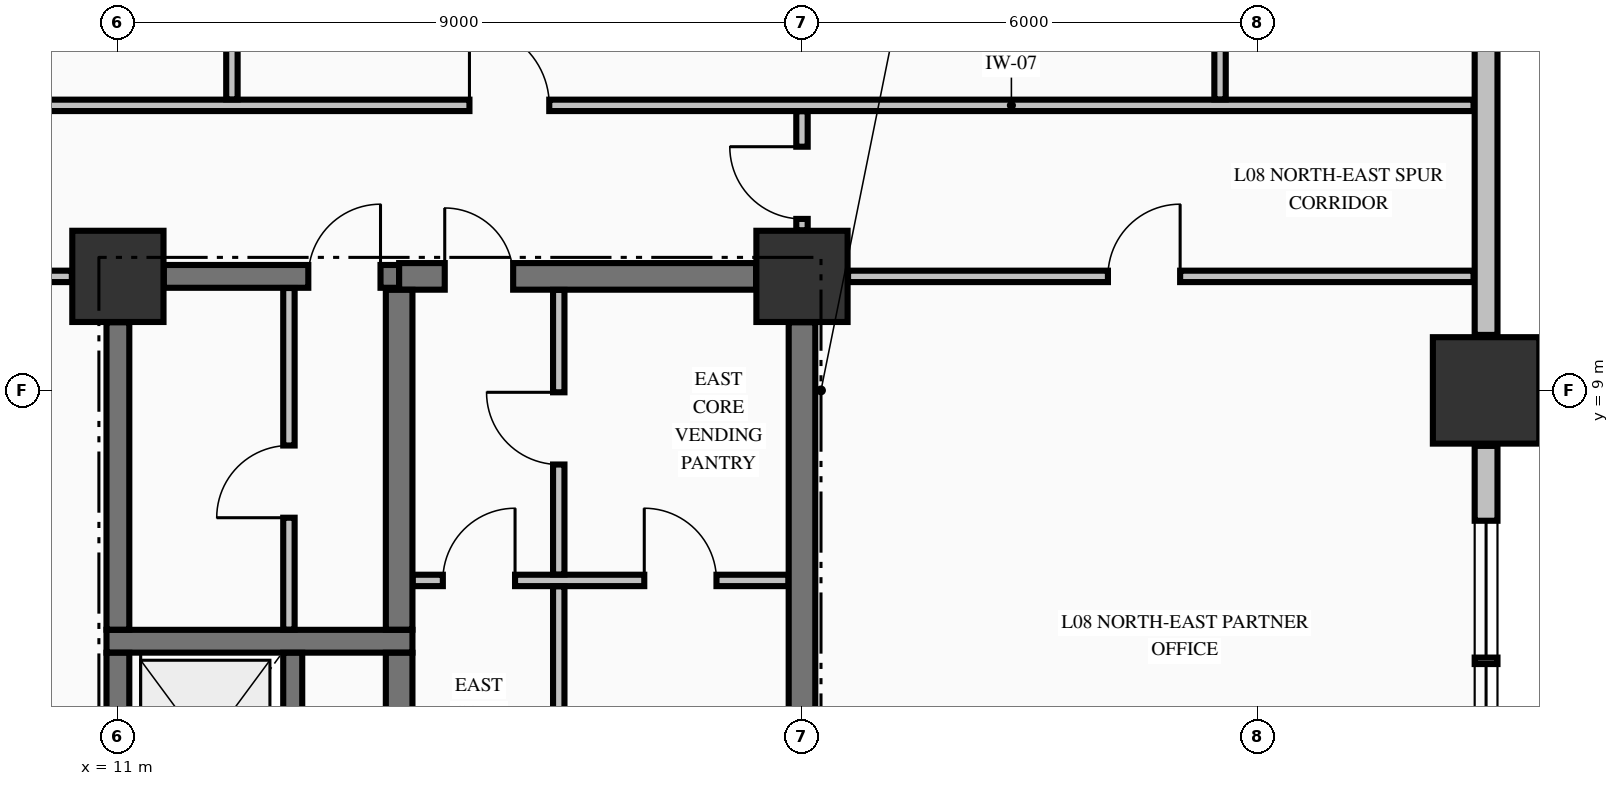
"""IFC4 building model, lengths in metres.
Left out: names, types, materials, properties, quantities, classifications, styles, units other than length and angle.
Written with IfcOpenShell. Run it as: python <this file> out.ifc"""

import sys

from ifc_helpers import new_model, si_unit, direction, frame, frame_2d, origin, origin_2d, place, context, subcontext, project, spatial, rectangle, extrude, element, fill, save


model = new_model("IFC4")
c1 = context("Model", 3, precision=1e-05, world=origin(), true_north=direction((0.0, 1.0)))
c2 = subcontext(c1, "Body", "Model", "MODEL_VIEW")
j1 = project(units=[si_unit("LENGTHUNIT", "METRE"), si_unit("PLANEANGLEUNIT", "RADIAN")], contexts=[c1])
p1 = place(None, origin())
s1 = spatial("IfcSite", under=j1, at=p1, CompositionType="ELEMENT")
p2 = place(p1, origin())
s2 = spatial("IfcBuilding", under=s1, at=p2, CompositionType="ELEMENT")
p3 = place(p2, frame((0.0, 0.0, 37.91)))
s3 = spatial("IfcBuildingStorey", under=s2, at=p3, CompositionType="ELEMENT", Elevation=37.91)
p4 = place(p3, frame((29.0, 9.0, -0.25), z_axis=(0.0, 0.0, 1.0), x_axis=(1.0, 0.0, 0.0)))
e1 = element("IfcColumn", 1, at=p4, inside=s3, PredefinedType="COLUMN", context=c2, shape_type="SweptSolid", body=[
    extrude(rectangle(XDim=1.4, YDim=1.4, at=origin_2d()), origin(), (0.0, 0.0, 1.0), 3.57),
])
for number, where, z_axis, x_axis in (
    (2, (11.0, 10.5, -0.25), (0.0, 0.0, 1.0), (1.0, 0.0, 0.0)),
    (3, (20.0, 10.5, -0.25), (0.0, 0.0, 1.0), (1.0, 0.0, 0.0)),
):
    element("IfcColumn", number, at=place(p3, frame(where, z_axis=z_axis, x_axis=x_axis)), inside=s3, PredefinedType="COLUMN", context=c2, shape_type="SweptSolid", body=[
        extrude(rectangle(XDim=1.2, YDim=1.2, at=origin_2d()), origin(), (0.0, 0.0, 1.0), 3.57),
    ])
p5 = place(p3, frame((29.0, 0.73, 0.0), z_axis=(0.0, 0.0, 1.0), x_axis=(0.0, 1.0, 0.0)))
e4 = element("IfcWall", 4, at=p5, inside=s3, PredefinedType="STANDARD", context=c2, shape_type="SweptSolid", body=[
    extrude(rectangle(XDim=7.54, YDim=0.3, at=frame_2d((3.77, 0.0))), origin(), (0.0, 0.0, 1.0), 2.712),
])
p6 = place(p5, frame((2.87, 0.0, 0.78)))
e5 = element("IfcOpeningElement", 5, at=p6, cuts=e4, PredefinedType="OPENING", context=c2, shape_type="SweptSolid", body=[
    extrude(rectangle(XDim=1.8, YDim=1.72, at=frame_2d((0.9, 0.86))), frame((0.0, 0.16, 0.0), z_axis=(0.0, -1.0, 0.0), x_axis=(1.0, 0.0, 0.0)), (0.0, 0.0, 1.0), 0.32),
])
p7 = place(p5, frame((4.755, 0.0, 0.78)))
e6 = element("IfcOpeningElement", 6, at=p7, cuts=e4, PredefinedType="OPENING", context=c2, shape_type="SweptSolid", body=[
    extrude(rectangle(XDim=1.8, YDim=1.72, at=frame_2d((0.9, 0.86))), frame((0.0, 0.16, 0.0), z_axis=(0.0, -1.0, 0.0), x_axis=(1.0, 0.0, 0.0)), (0.0, 0.0, 1.0), 0.32),
])
p8 = place(p3, frame((29.0, 9.73, 0.0), z_axis=(0.0, 0.0, 1.0), x_axis=(0.0, 1.0, 0.0)))
e7 = element("IfcWall", 7, at=p8, inside=s3, PredefinedType="STANDARD", context=c2, shape_type="SweptSolid", body=[
    extrude(rectangle(XDim=12.54, YDim=0.3, at=frame_2d((6.27, 0.0))), origin(), (0.0, 0.0, 1.0), 2.712),
])
p9 = place(p3, frame((10.85, 5.7, 0.0), z_axis=(0.0, 0.0, 1.0), x_axis=(1.0, 0.0, 0.0)))
e8 = element("IfcWall", 8, at=p9, inside=s3, PredefinedType="SHEAR", context=c2, shape_type="SweptSolid", body=[
    extrude(rectangle(XDim=4.025, YDim=0.3, at=frame_2d((2.012, 0.0))), origin(), (0.0, 0.0, 1.0), 3.32),
])
p10 = place(p3, frame((11.604, 10.5, 0.0), z_axis=(0.0, 0.0, 1.0), x_axis=(1.0, 0.0, 0.0)))
e9 = element("IfcWall", 9, at=p10, inside=s3, PredefinedType="SHEAR", context=c2, shape_type="SweptSolid", body=[
    extrude(rectangle(XDim=3.096, YDim=0.3, at=frame_2d((1.548, 0.0))), origin(), (0.0, 0.0, 1.0), 3.32),
])
p11 = place(p10, frame((1.901, 0.0, 0.0)))
e10 = element("IfcOpeningElement", 10, at=p11, cuts=e9, PredefinedType="OPENING", context=c2, shape_type="SweptSolid", body=[
    extrude(rectangle(XDim=0.95, YDim=2.15, at=frame_2d((0.475, 1.075))), frame((0.0, 0.16, 0.0), z_axis=(0.0, -1.0, 0.0), x_axis=(1.0, 0.0, 0.0)), (0.0, 0.0, 1.0), 0.32),
])
p12 = place(p3, frame((14.7, 10.5, 0.0), z_axis=(0.0, 0.0, 1.0), x_axis=(1.0, 0.0, 0.0)))
e11 = element("IfcWall", 11, at=p12, inside=s3, PredefinedType="SHEAR", context=c2, shape_type="SweptSolid", body=[
    extrude(rectangle(XDim=4.696, YDim=0.35, at=frame_2d((2.348, 0.0))), origin(), (0.0, 0.0, 1.0), 3.32),
])
p13 = place(p12, frame((0.6, 0.0, 0.0)))
e12 = element("IfcOpeningElement", 12, at=p13, cuts=e11, PredefinedType="OPENING", context=c2, shape_type="SweptSolid", body=[
    extrude(rectangle(XDim=0.9, YDim=2.15, at=frame_2d((0.45, 1.075))), frame((0.0, 0.185, 0.0), z_axis=(0.0, -1.0, 0.0), x_axis=(1.0, 0.0, 0.0)), (0.0, 0.0, 1.0), 0.37),
])
p14 = place(p3, frame((14.878, 6.5, 0.0), z_axis=(0.0, 0.0, 1.0), x_axis=(1.0, 0.0, 0.0)))
e13 = element("IfcWall", 13, at=p14, inside=s3, PredefinedType="PARTITIONING", context=c2, shape_type="SweptSolid", body=[
    extrude(rectangle(XDim=4.944, YDim=0.15, at=frame_2d((2.472, 0.0))), origin(), (0.0, 0.0, 1.0), 3.32),
])
p15 = place(p14, frame((0.397, 0.0, 0.0)))
e14 = element("IfcOpeningElement", 14, at=p15, cuts=e13, PredefinedType="OPENING", context=c2, shape_type="SweptSolid", body=[
    extrude(rectangle(XDim=0.95, YDim=2.15, at=frame_2d((0.475, 1.075))), frame((0.0, 0.085, 0.0), z_axis=(0.0, -1.0, 0.0), x_axis=(1.0, 0.0, 0.0)), (0.0, 0.0, 1.0), 0.17),
])
p16 = place(p14, frame((3.047, 0.0, 0.0)))
e15 = element("IfcOpeningElement", 15, at=p16, cuts=e13, PredefinedType="OPENING", context=c2, shape_type="SweptSolid", body=[
    extrude(rectangle(XDim=0.95, YDim=2.15, at=frame_2d((0.475, 1.075))), frame((0.0, 0.085, 0.0), z_axis=(0.0, -1.0, 0.0), x_axis=(1.0, 0.0, 0.0)), (0.0, 0.0, 1.0), 0.17),
])
p17 = place(p3, frame((-10.394, 10.5, 0.0), z_axis=(0.0, 0.0, 1.0), x_axis=(1.0, 0.0, 0.0)))
e16 = element("IfcWall", 16, at=p17, inside=s3, PredefinedType="PARTITIONING", context=c2, shape_type="SweptSolid", body=[
    extrude(rectangle(XDim=20.788, YDim=0.15, at=frame_2d((10.394, 0.0))), origin(), (0.0, 0.0, 1.0), 3.32),
])
p18 = place(p17, frame((0.319, 0.0, 0.0)))
e17 = element("IfcOpeningElement", 17, at=p18, cuts=e16, PredefinedType="OPENING", context=c2, shape_type="SweptSolid", body=[
    extrude(rectangle(XDim=1.05, YDim=2.15, at=frame_2d((0.525, 1.075))), frame((0.0, 0.085, 0.0), z_axis=(0.0, -1.0, 0.0), x_axis=(1.0, 0.0, 0.0)), (0.0, 0.0, 1.0), 0.17),
])
p19 = place(p17, frame((19.419, 0.0, 0.0)))
e18 = element("IfcOpeningElement", 18, at=p19, cuts=e16, PredefinedType="OPENING", context=c2, shape_type="SweptSolid", body=[
    extrude(rectangle(XDim=1.05, YDim=2.15, at=frame_2d((0.525, 1.075))), frame((0.0, 0.085, 0.0), z_axis=(0.0, -1.0, 0.0), x_axis=(1.0, 0.0, 0.0)), (0.0, 0.0, 1.0), 0.17),
])
p20 = place(p3, frame((20.606, 10.5, 0.0), z_axis=(0.0, 0.0, 1.0), x_axis=(1.0, 0.0, 0.0)))
e19 = element("IfcWall", 19, at=p20, inside=s3, PredefinedType="PARTITIONING", context=c2, shape_type="SweptSolid", body=[
    extrude(rectangle(XDim=8.229, YDim=0.15, at=frame_2d((4.115, 0.0))), origin(), (0.0, 0.0, 1.0), 3.32),
])
p21 = place(p20, frame((3.419, 0.0, 0.0)))
e20 = element("IfcOpeningElement", 20, at=p21, cuts=e19, PredefinedType="OPENING", context=c2, shape_type="SweptSolid", body=[
    extrude(rectangle(XDim=0.95, YDim=2.15, at=frame_2d((0.475, 1.075))), frame((0.0, 0.085, 0.0), z_axis=(0.0, -1.0, 0.0), x_axis=(1.0, 0.0, 0.0)), (0.0, 0.0, 1.0), 0.17),
])
p22 = place(p3, frame((-23.835, 12.75, 0.0), z_axis=(0.0, 0.0, 1.0), x_axis=(1.0, 0.0, 0.0)))
e21 = element("IfcWall", 21, at=p22, inside=s3, PredefinedType="PARTITIONING", context=c2, shape_type="SweptSolid", body=[
    extrude(rectangle(XDim=52.67, YDim=0.15, at=frame_2d((26.335, 0.0))), origin(), (0.0, 0.0, 1.0), 3.32),
])
p23 = place(p22, frame((5.71, 0.0, 0.0)))
e22 = element("IfcOpeningElement", 22, at=p23, cuts=e21, PredefinedType="OPENING", context=c2, shape_type="SweptSolid", body=[
    extrude(rectangle(XDim=0.95, YDim=2.15, at=frame_2d((0.475, 1.075))), frame((0.0, 0.085, 0.0), z_axis=(0.0, -1.0, 0.0), x_axis=(1.0, 0.0, 0.0)), (0.0, 0.0, 1.0), 0.17),
])
p24 = place(p22, frame((13.21, 0.0, 0.0)))
e23 = element("IfcOpeningElement", 23, at=p24, cuts=e21, PredefinedType="OPENING", context=c2, shape_type="SweptSolid", body=[
    extrude(rectangle(XDim=0.95, YDim=2.15, at=frame_2d((0.475, 1.075))), frame((0.0, 0.085, 0.0), z_axis=(0.0, -1.0, 0.0), x_axis=(1.0, 0.0, 0.0)), (0.0, 0.0, 1.0), 0.17),
])
p25 = place(p22, frame((17.56, 0.0, 0.0)))
e24 = element("IfcOpeningElement", 24, at=p25, cuts=e21, PredefinedType="OPENING", context=c2, shape_type="SweptSolid", body=[
    extrude(rectangle(XDim=0.95, YDim=2.15, at=frame_2d((0.475, 1.075))), frame((0.0, 0.085, 0.0), z_axis=(0.0, -1.0, 0.0), x_axis=(1.0, 0.0, 0.0)), (0.0, 0.0, 1.0), 0.17),
])
p26 = place(p22, frame((21.91, 0.0, 0.0)))
e25 = element("IfcOpeningElement", 25, at=p26, cuts=e21, PredefinedType="OPENING", context=c2, shape_type="SweptSolid", body=[
    extrude(rectangle(XDim=0.95, YDim=2.15, at=frame_2d((0.475, 1.075))), frame((0.0, 0.085, 0.0), z_axis=(0.0, -1.0, 0.0), x_axis=(1.0, 0.0, 0.0)), (0.0, 0.0, 1.0), 0.17),
])
p27 = place(p22, frame((31.21, 0.0, 0.0)))
e26 = element("IfcOpeningElement", 26, at=p27, cuts=e21, PredefinedType="OPENING", context=c2, shape_type="SweptSolid", body=[
    extrude(rectangle(XDim=1.05, YDim=2.15, at=frame_2d((0.525, 1.075))), frame((0.0, 0.085, 0.0), z_axis=(0.0, -1.0, 0.0), x_axis=(1.0, 0.0, 0.0)), (0.0, 0.0, 1.0), 0.17),
])
p28 = place(p22, frame((39.46, 0.0, 0.0)))
e27 = element("IfcOpeningElement", 27, at=p28, cuts=e21, PredefinedType="OPENING", context=c2, shape_type="SweptSolid", body=[
    extrude(rectangle(XDim=1.05, YDim=2.15, at=frame_2d((0.525, 1.075))), frame((0.0, 0.085, 0.0), z_axis=(0.0, -1.0, 0.0), x_axis=(1.0, 0.0, 0.0)), (0.0, 0.0, 1.0), 0.17),
])
p29 = place(p3, frame((11.0, 3.052, 0.0), z_axis=(0.0, 0.0, 1.0), x_axis=(0.0, 1.0, 0.0)))
e28 = element("IfcWall", 28, at=p29, inside=s3, PredefinedType="SHEAR", context=c2, shape_type="SweptSolid", body=[
    extrude(rectangle(XDim=2.496, YDim=0.3, at=frame_2d((1.248, 0.0))), origin(), (0.0, 0.0, 1.0), 3.32),
])
p30 = place(p3, frame((11.0, 5.852, 0.0), z_axis=(0.0, 0.0, 1.0), x_axis=(0.0, 1.0, 0.0)))
e29 = element("IfcWall", 29, at=p30, inside=s3, PredefinedType="SHEAR", context=c2, shape_type="SweptSolid", body=[
    extrude(rectangle(XDim=4.044, YDim=0.3, at=frame_2d((2.022, 0.0))), origin(), (0.0, 0.0, 1.0), 3.32),
])
p31 = place(p3, frame((13.3, 3.052, 0.0), z_axis=(0.0, 0.0, 1.0), x_axis=(0.0, 1.0, 0.0)))
e30 = element("IfcWall", 30, at=p31, inside=s3, PredefinedType="SOLIDWALL", context=c2, shape_type="SweptSolid", body=[
    extrude(rectangle(XDim=2.496, YDim=0.25, at=frame_2d((1.248, 0.0))), origin(), (0.0, 0.0, 1.0), 3.32),
])
p32 = place(p3, frame((14.7, 3.052, 0.0), z_axis=(0.0, 0.0, 1.0), x_axis=(0.0, 1.0, 0.0)))
e31 = element("IfcWall", 31, at=p32, inside=s3, PredefinedType="SHEAR", context=c2, shape_type="SweptSolid", body=[
    extrude(rectangle(XDim=2.496, YDim=0.35, at=frame_2d((1.248, 0.0))), origin(), (0.0, 0.0, 1.0), 3.32),
])
p33 = place(p3, frame((14.7, 5.852, 0.0), z_axis=(0.0, 0.0, 1.0), x_axis=(0.0, 1.0, 0.0)))
e32 = element("IfcWall", 32, at=p33, inside=s3, PredefinedType="SHEAR", context=c2, shape_type="SweptSolid", body=[
    extrude(rectangle(XDim=4.471, YDim=0.35, at=frame_2d((2.235, 0.0))), origin(), (0.0, 0.0, 1.0), 3.32),
])
p34 = place(p3, frame((20.0, 0.604, 0.0), z_axis=(0.0, 0.0, 1.0), x_axis=(0.0, 1.0, 0.0)))
e33 = element("IfcWall", 33, at=p34, inside=s3, PredefinedType="SHEAR", context=c2, shape_type="SweptSolid", body=[
    extrude(rectangle(XDim=9.292, YDim=0.35, at=frame_2d((4.646, 0.0))), origin(), (0.0, 0.0, 1.0), 3.32),
])
p35 = place(p3, frame((12.5, 12.828, 0.0), z_axis=(0.0, 0.0, 1.0), x_axis=(0.0, 1.0, 0.0)))
e34 = element("IfcWall", 34, at=p35, inside=s3, PredefinedType="PARTITIONING", context=c2, shape_type="SweptSolid", body=[
    extrude(rectangle(XDim=13.507, YDim=0.15, at=frame_2d((6.753, 0.0))), origin(), (0.0, 0.0, 1.0), 3.32),
])
p36 = place(p3, frame((13.25, 5.853, 0.0), z_axis=(0.0, 0.0, 1.0), x_axis=(0.0, 1.0, 0.0)))
e35 = element("IfcWall", 35, at=p36, inside=s3, PredefinedType="PARTITIONING", context=c2, shape_type="SweptSolid", body=[
    extrude(rectangle(XDim=4.494, YDim=0.15, at=frame_2d((2.247, 0.0))), origin(), (0.0, 0.0, 1.0), 3.32),
])
p37 = place(p36, frame((1.472, 0.0, 0.0)))
e36 = element("IfcOpeningElement", 36, at=p37, cuts=e35, PredefinedType="OPENING", context=c2, shape_type="SweptSolid", body=[
    extrude(rectangle(XDim=0.95, YDim=2.15, at=frame_2d((0.475, 1.075))), frame((0.0, 0.085, 0.0), z_axis=(0.0, -1.0, 0.0), x_axis=(1.0, 0.0, 0.0)), (0.0, 0.0, 1.0), 0.17),
])
p38 = place(p3, frame((16.8, 2.278, 0.0), z_axis=(0.0, 0.0, 1.0), x_axis=(0.0, 1.0, 0.0)))
e37 = element("IfcWall", 37, at=p38, inside=s3, PredefinedType="PARTITIONING", context=c2, shape_type="SweptSolid", body=[
    extrude(rectangle(XDim=4.144, YDim=0.15, at=frame_2d((2.072, 0.0))), origin(), (0.0, 0.0, 1.0), 3.32),
])
p39 = place(p3, frame((16.8, 6.578, 0.0), z_axis=(0.0, 0.0, 1.0), x_axis=(0.0, 1.0, 0.0)))
e38 = element("IfcWall", 38, at=p39, inside=s3, PredefinedType="PARTITIONING", context=c2, shape_type="SweptSolid", body=[
    extrude(rectangle(XDim=3.744, YDim=0.15, at=frame_2d((1.872, 0.0))), origin(), (0.0, 0.0, 1.0), 3.32),
])
p40 = place(p39, frame((1.447, 0.0, 0.0)))
e39 = element("IfcOpeningElement", 39, at=p40, cuts=e38, PredefinedType="OPENING", context=c2, shape_type="SweptSolid", body=[
    extrude(rectangle(XDim=0.95, YDim=2.15, at=frame_2d((0.475, 1.075))), frame((0.0, 0.085, 0.0), z_axis=(0.0, -1.0, 0.0), x_axis=(1.0, 0.0, 0.0)), (0.0, 0.0, 1.0), 0.17),
])
p41 = place(p3, frame((20.0, 11.106, 0.0), z_axis=(0.0, 0.0, 1.0), x_axis=(0.0, 1.0, 0.0)))
e40 = element("IfcWall", 40, at=p41, inside=s3, PredefinedType="PARTITIONING", context=c2, shape_type="SweptSolid", body=[
    extrude(rectangle(XDim=1.566, YDim=0.15, at=frame_2d((0.783, 0.0))), origin(), (0.0, 0.0, 1.0), 2.66),
])
p42 = place(p41, frame((0.15, 0.0, 0.0)))
e41 = element("IfcOpeningElement", 41, at=p42, cuts=e40, PredefinedType="OPENING", context=c2, shape_type="SweptSolid", body=[
    extrude(rectangle(XDim=0.95, YDim=2.15, at=frame_2d((0.475, 1.075))), frame((0.0, 0.085, 0.0), z_axis=(0.0, -1.0, 0.0), x_axis=(1.0, 0.0, 0.0)), (0.0, 0.0, 1.0), 0.17),
])
p43 = place(p3, frame((25.5, 12.828, 0.0), z_axis=(0.0, 0.0, 1.0), x_axis=(0.0, 1.0, 0.0)))
e42 = element("IfcWall", 42, at=p43, inside=s3, PredefinedType="PARTITIONING", context=c2, shape_type="SweptSolid", body=[
    extrude(rectangle(XDim=9.466, YDim=0.15, at=frame_2d((4.733, 0.0))), origin(), (0.0, 0.0, 1.0), 3.32),
])
p44 = place(p6, origin())
e43 = element("IfcWindow", 43, at=p44, inside=s3, PartitioningType="SINGLE_PANEL", PredefinedType="WINDOW", context=c2, shape_type="SweptSolid", body=[
    extrude(rectangle(XDim=1.8, YDim=1.72, at=frame_2d((0.9, 0.86))), frame((0.0, 0.03, 0.0), z_axis=(0.0, -1.0, 0.0), x_axis=(1.0, 0.0, 0.0)), (0.0, 0.0, 1.0), 0.06),
])
fill(e5, e43)
p45 = place(p7, origin())
e44 = element("IfcWindow", 44, at=p45, inside=s3, PartitioningType="SINGLE_PANEL", PredefinedType="WINDOW", context=c2, shape_type="SweptSolid", body=[
    extrude(rectangle(XDim=1.8, YDim=1.72, at=frame_2d((0.9, 0.86))), frame((0.0, 0.03, 0.0), z_axis=(0.0, -1.0, 0.0), x_axis=(1.0, 0.0, 0.0)), (0.0, 0.0, 1.0), 0.06),
])
fill(e6, e44)
p46 = place(p11, origin())
e45 = element("IfcDoor", 45, at=p46, inside=s3, OperationType="SINGLE_SWING_RIGHT", PredefinedType="DOOR", context=c2, shape_type="SweptSolid", body=[
    extrude(rectangle(XDim=0.95, YDim=2.15, at=frame_2d((0.475, 1.075))), frame((0.0, 0.025, 0.0), z_axis=(0.0, -1.0, 0.0), x_axis=(1.0, 0.0, 0.0)), (0.0, 0.0, 1.0), 0.05),
])
fill(e10, e45)
p47 = place(p37, origin())
e46 = element("IfcDoor", 46, at=p47, inside=s3, OperationType="SINGLE_SWING_LEFT", PredefinedType="DOOR", context=c2, shape_type="SweptSolid", body=[
    extrude(rectangle(XDim=0.95, YDim=2.15, at=frame_2d((0.475, 1.075))), frame((0.0, 0.025, 0.0), z_axis=(0.0, -1.0, 0.0), x_axis=(1.0, 0.0, 0.0)), (0.0, 0.0, 1.0), 0.05),
])
fill(e36, e46)
p48 = place(p13, origin())
e47 = element("IfcDoor", 47, at=p48, inside=s3, OperationType="SINGLE_SWING_LEFT", PredefinedType="DOOR", context=c2, shape_type="SweptSolid", body=[
    extrude(rectangle(XDim=0.9, YDim=2.15, at=frame_2d((0.45, 1.075))), frame((0.0, 0.025, 0.0), z_axis=(0.0, -1.0, 0.0), x_axis=(1.0, 0.0, 0.0)), (0.0, 0.0, 1.0), 0.05),
])
fill(e12, e47)
p49 = place(p15, origin())
e48 = element("IfcDoor", 48, at=p49, inside=s3, OperationType="SINGLE_SWING_RIGHT", PredefinedType="DOOR", context=c2, shape_type="SweptSolid", body=[
    extrude(rectangle(XDim=0.95, YDim=2.15, at=frame_2d((0.475, 1.075))), frame((0.0, 0.025, 0.0), z_axis=(0.0, -1.0, 0.0), x_axis=(1.0, 0.0, 0.0)), (0.0, 0.0, 1.0), 0.05),
])
fill(e14, e48)
p50 = place(p40, origin())
e49 = element("IfcDoor", 49, at=p50, inside=s3, OperationType="SINGLE_SWING_RIGHT", PredefinedType="DOOR", context=c2, shape_type="SweptSolid", body=[
    extrude(rectangle(XDim=0.95, YDim=2.15, at=frame_2d((0.475, 1.075))), frame((0.0, 0.025, 0.0), z_axis=(0.0, -1.0, 0.0), x_axis=(1.0, 0.0, 0.0)), (0.0, 0.0, 1.0), 0.05),
])
fill(e39, e49)
p51 = place(p16, origin())
e50 = element("IfcDoor", 50, at=p51, inside=s3, OperationType="SINGLE_SWING_LEFT", PredefinedType="DOOR", context=c2, shape_type="SweptSolid", body=[
    extrude(rectangle(XDim=0.95, YDim=2.15, at=frame_2d((0.475, 1.075))), frame((0.0, 0.025, 0.0), z_axis=(0.0, -1.0, 0.0), x_axis=(1.0, 0.0, 0.0)), (0.0, 0.0, 1.0), 0.05),
])
fill(e15, e50)
p52 = place(p28, origin())
e51 = element("IfcDoor", 51, at=p52, inside=s3, OperationType="SINGLE_SWING_LEFT", PredefinedType="DOOR", context=c2, shape_type="SweptSolid", body=[
    extrude(rectangle(XDim=1.05, YDim=2.15, at=frame_2d((0.525, 1.075))), frame((0.0, 0.025, 0.0), z_axis=(0.0, -1.0, 0.0), x_axis=(1.0, 0.0, 0.0)), (0.0, 0.0, 1.0), 0.05),
])
fill(e27, e51)
p53 = place(p42, origin())
e52 = element("IfcDoor", 52, at=p53, inside=s3, OperationType="SINGLE_SWING_RIGHT", PredefinedType="DOOR", context=c2, shape_type="SweptSolid", body=[
    extrude(rectangle(XDim=0.95, YDim=2.15, at=frame_2d((0.475, 1.075))), frame((0.0, 0.025, 0.0), z_axis=(0.0, -1.0, 0.0), x_axis=(1.0, 0.0, 0.0)), (0.0, 0.0, 1.0), 0.05),
])
fill(e41, e52)
p54 = place(p21, origin())
e53 = element("IfcDoor", 53, at=p54, inside=s3, OperationType="SINGLE_SWING_RIGHT", PredefinedType="DOOR", context=c2, shape_type="SweptSolid", body=[
    extrude(rectangle(XDim=0.95, YDim=2.15, at=frame_2d((0.475, 1.075))), frame((0.0, 0.025, 0.0), z_axis=(0.0, -1.0, 0.0), x_axis=(1.0, 0.0, 0.0)), (0.0, 0.0, 1.0), 0.05),
])
fill(e20, e53)
save(model, sys.argv[1])
